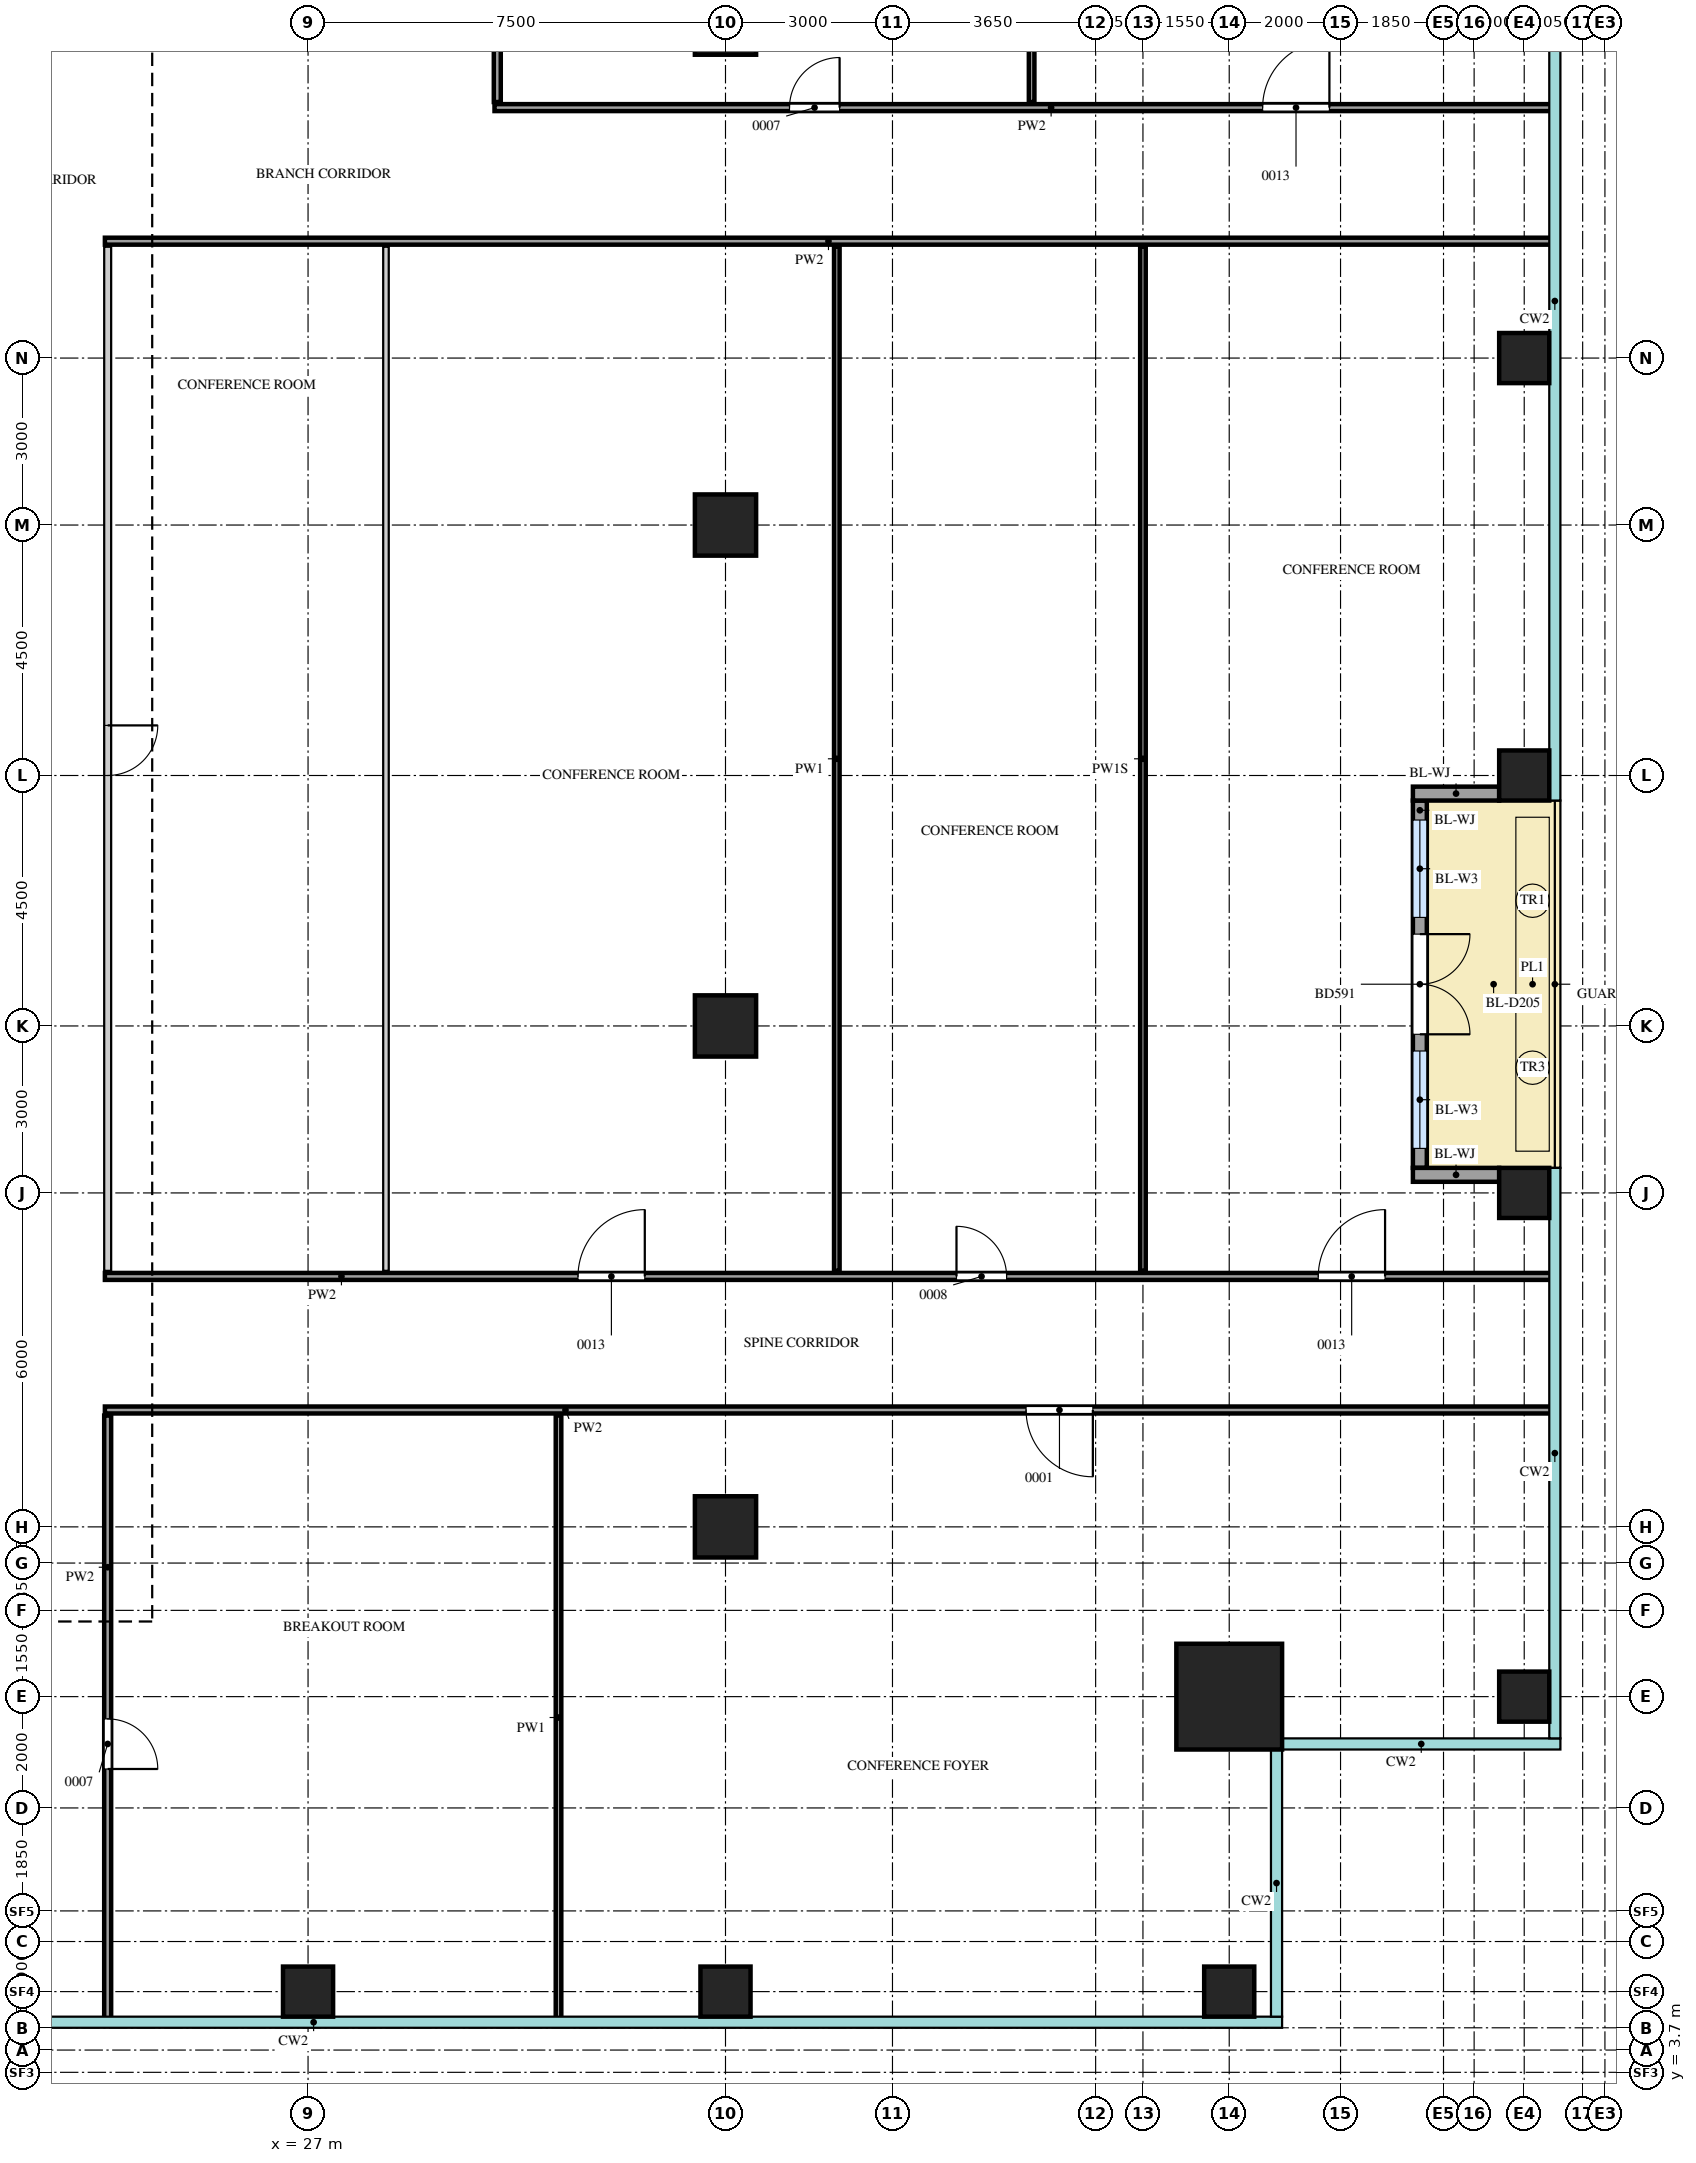
"""IFC4 building model, lengths in metres.
Left out: names, types, materials, properties, quantities, classifications, styles, units other than length and angle.
Written with IfcOpenShell. Run it as: python <this file> out.ifc"""

import sys

from ifc_helpers import new_model, si_unit, direction, frame, frame_2d, origin, origin_2d, place, context, subcontext, project, spatial, rectangle, extrude, source, transform, mapped, element, fill, save


model = new_model("IFC4")
c1 = context("Model", 3, precision=1e-05, world=origin(), true_north=direction((0.0, 1.0)))
c2 = subcontext(c1, "Body", "Model", "MODEL_VIEW")
j1 = project(units=[si_unit("LENGTHUNIT", "METRE"), si_unit("PLANEANGLEUNIT", "RADIAN")], contexts=[c1])
p1 = place(None, origin())
s1 = spatial("IfcSite", under=j1, at=p1, CompositionType="ELEMENT")
p2 = place(p1, origin())
s2 = spatial("IfcBuilding", under=s1, at=p2, CompositionType="ELEMENT")
p3 = place(p2, frame((0.0, 0.0, 262.2)))
s3 = spatial("IfcBuildingStorey", under=s2, at=p3, CompositionType="ELEMENT", Elevation=262.2)
m1 = source(origin(), c2, "Body", "SweptSolid", [
    extrude(rectangle(XDim=1.9, YDim=1.9, at=origin_2d()), origin(), (0.0, 0.0, 1.0), 4.0),
])
p4 = place(p3, frame((43.55, 10.45, 0.0), z_axis=(0.0, 0.0, 1.0), x_axis=(1.0, 0.0, 0.0)))
e1 = element("IfcColumn", 1, at=p4, inside=s3, PredefinedType="COLUMN", context=c2, shape_type="MappedRepresentation", body=[
    mapped(m1, transform((0.0, 0.0, 0.0))),
])
m2 = source(origin(), c2, "Body", "SweptSolid", [
    extrude(rectangle(XDim=0.9, YDim=0.9, at=origin_2d()), origin(), (0.0, 0.0, 1.0), 3.75),
])
for number, where, z_axis, x_axis in (
    (2, (27.0, 5.15, 0.0), (0.0, 0.0, 1.0), (1.0, 0.0, 0.0)),
    (3, (34.5, 5.15, 0.0), (0.0, 0.0, 1.0), (1.0, 0.0, 0.0)),
    (4, (43.55, 5.15, 0.0), (0.0, 0.0, 1.0), (1.0, 0.0, 0.0)),
    (5, (48.85, 10.45, 0.0), (0.0, 0.0, 1.0), (1.0, 0.0, 0.0)),
    (6, (48.85, 19.5, 0.0), (0.0, 0.0, 1.0), (1.0, 0.0, 0.0)),
    (7, (48.85, 27.0, 0.0), (0.0, 0.0, 1.0), (1.0, 0.0, 0.0)),
    (8, (48.85, 34.5, 0.0), (0.0, 0.0, 1.0), (1.0, 0.0, 0.0)),
):
    element("IfcColumn", number, at=place(p3, frame(where, z_axis=z_axis, x_axis=x_axis)), inside=s3, PredefinedType="COLUMN", context=c2, shape_type="MappedRepresentation", body=[
        mapped(m2, transform((0.0, 0.0, 0.0))),
    ])
m3 = source(origin(), c2, "Body", "SweptSolid", [
    extrude(rectangle(XDim=1.1, YDim=1.1, at=origin_2d()), origin(), (0.0, 0.0, 1.0), 3.75),
])
for number, where, z_axis, x_axis in (
    (9, (34.5, 13.5, 0.0), (0.0, 0.0, 1.0), (1.0, 0.0, 0.0)),
    (10, (34.5, 22.5, 0.0), (0.0, 0.0, 1.0), (1.0, 0.0, 0.0)),
    (11, (34.5, 31.5, 0.0), (0.0, 0.0, 1.0), (1.0, 0.0, 0.0)),
    (12, (34.5, 40.5, 0.0), (0.0, 0.0, 1.0), (1.0, 0.0, 0.0)),
):
    element("IfcColumn", number, at=place(p3, frame(where, z_axis=z_axis, x_axis=x_axis)), inside=s3, PredefinedType="COLUMN", context=c2, shape_type="MappedRepresentation", body=[
        mapped(m3, transform((0.0, 0.0, 0.0))),
    ])
m4 = source(origin(), c2, "Body", "SweptSolid", [
    extrude(rectangle(XDim=6.6, YDim=0.25, at=frame_2d((3.3, 0.0))), origin(), (0.0, 0.0, 1.0), 3.2),
])
p5 = place(p3, frame((46.975, 19.95, 0.0), z_axis=(0.0, 0.0, 1.0), x_axis=(0.0, 1.0, 0.0)))
e13 = element("IfcWall", 13, at=p5, inside=s3, PredefinedType="SOLIDWALL", context=c2, shape_type="MappedRepresentation", body=[
    mapped(m4, transform((0.0, 0.0, 0.0))),
])
m5 = source(origin(), c2, "Body", "SweptSolid", [
    extrude(rectangle(XDim=1.75, YDim=2.4, at=frame_2d((0.875, 1.2))), frame((0.0, 0.135, 0.0), z_axis=(0.0, -1.0, 0.0), x_axis=(1.0, 0.0, 0.0)), (0.0, 0.0, 1.0), 0.27),
])
p6 = place(p5, frame((0.35, 0.0, 0.0)))
e14 = element("IfcOpeningElement", 14, at=p6, cuts=e13, PredefinedType="OPENING", context=c2, shape_type="MappedRepresentation", body=[
    mapped(m5, transform((0.0, 0.0, 0.0))),
])
p7 = place(p5, frame((4.5, 0.0, 0.0)))
e15 = element("IfcOpeningElement", 15, at=p7, cuts=e13, PredefinedType="OPENING", context=c2, shape_type="MappedRepresentation", body=[
    mapped(m5, transform((0.0, 0.0, 0.0))),
])
m6 = source(origin(), c2, "Body", "SweptSolid", [
    extrude(rectangle(XDim=1.8, YDim=2.4, at=frame_2d((0.9, 1.2))), frame((0.0, 0.135, 0.0), z_axis=(0.0, -1.0, 0.0), x_axis=(1.0, 0.0, 0.0)), (0.0, 0.0, 1.0), 0.27),
])
p8 = place(p5, frame((2.4, 0.0, 0.0)))
e16 = element("IfcOpeningElement", 16, at=p8, cuts=e13, PredefinedType="OPENING", context=c2, shape_type="MappedRepresentation", body=[
    mapped(m6, transform((0.0, 0.0, 0.0))),
])
m7 = source(origin(), c2, "Body", "SweptSolid", [
    extrude(rectangle(XDim=1.55, YDim=0.25, at=frame_2d((0.775, 0.0))), origin(), (0.0, 0.0, 1.0), 3.2),
])
for number, where, z_axis, x_axis in (
    (17, (48.4, 19.825, 0.0), (0.0, 0.0, 1.0), (-1.0, 0.0, 0.0)),
    (18, (48.4, 26.675, 0.0), (0.0, 0.0, 1.0), (-1.0, 0.0, 0.0)),
):
    element("IfcWall", number, at=place(p3, frame(where, z_axis=z_axis, x_axis=x_axis)), inside=s3, PredefinedType="SOLIDWALL", context=c2, shape_type="MappedRepresentation", body=[
        mapped(m7, transform((0.0, 0.0, 0.0))),
    ])
m8 = source(origin(), c2, "Body", "SweptSolid", [
    extrude(rectangle(XDim=10.85, YDim=0.125, at=frame_2d((5.425, 0.0))), origin(), (0.0, 0.0, 1.0), 3.8),
])
p9 = place(p3, frame((23.4, 4.65, 0.0), z_axis=(0.0, 0.0, 1.0), x_axis=(0.0, 1.0, 0.0)))
e19 = element("IfcWall", 19, at=p9, inside=s3, PredefinedType="PARTITIONING", context=c2, shape_type="MappedRepresentation", body=[
    mapped(m8, transform((0.0, 0.0, 0.0))),
])
m9 = source(origin(), c2, "Body", "SweptSolid", [
    extrude(rectangle(XDim=0.9, YDim=2.1, at=frame_2d((0.45, 1.05))), frame((0.0, 0.073, 0.0), z_axis=(0.0, -1.0, 0.0), x_axis=(1.0, 0.0, 0.0)), (0.0, 0.0, 1.0), 0.145),
])
p10 = place(p9, frame((4.5, 0.0, 0.0)))
e20 = element("IfcOpeningElement", 20, at=p10, cuts=e19, PredefinedType="OPENING", context=c2, shape_type="MappedRepresentation", body=[
    mapped(m9, transform((0.0, 0.0, 0.0))),
])
m10 = source(origin(), c2, "Body", "SweptSolid", [
    extrude(rectangle(XDim=10.85, YDim=0.1, at=frame_2d((5.425, 0.0))), origin(), (0.0, 0.0, 1.0), 3.8),
])
p11 = place(p3, frame((31.5, 4.65, 0.0), z_axis=(0.0, 0.0, 1.0), x_axis=(0.0, 1.0, 0.0)))
e21 = element("IfcWall", 21, at=p11, inside=s3, PredefinedType="PARTITIONING", context=c2, shape_type="MappedRepresentation", body=[
    mapped(m10, transform((0.0, 0.0, 0.0))),
])
m11 = source(origin(), c2, "Body", "SweptSolid", [
    extrude(rectangle(XDim=26.0, YDim=0.125, at=frame_2d((13.0, 0.0))), origin(), (0.0, 0.0, 1.0), 3.8),
])
p12 = place(p3, frame((23.35, 15.6, 0.0), z_axis=(0.0, 0.0, 1.0), x_axis=(1.0, 0.0, 0.0)))
e22 = element("IfcWall", 22, at=p12, inside=s3, PredefinedType="PARTITIONING", context=c2, shape_type="MappedRepresentation", body=[
    mapped(m11, transform((0.0, 0.0, 0.0))),
])
m12 = source(origin(), c2, "Body", "SweptSolid", [
    extrude(rectangle(XDim=1.2, YDim=2.1, at=frame_2d((0.6, 1.05))), frame((0.0, 0.073, 0.0), z_axis=(0.0, -1.0, 0.0), x_axis=(1.0, 0.0, 0.0)), (0.0, 0.0, 1.0), 0.145),
])
p13 = place(p12, frame((16.55, 0.0, 0.0)))
e23 = element("IfcOpeningElement", 23, at=p13, cuts=e22, PredefinedType="OPENING", context=c2, shape_type="MappedRepresentation", body=[
    mapped(m12, transform((0.0, 0.0, 0.0))),
])
p14 = place(p3, frame((23.35, 18.0, 0.0), z_axis=(0.0, 0.0, 1.0), x_axis=(1.0, 0.0, 0.0)))
e24 = element("IfcWall", 24, at=p14, inside=s3, PredefinedType="PARTITIONING", context=c2, shape_type="MappedRepresentation", body=[
    mapped(m11, transform((0.0, 0.0, 0.0))),
])
p15 = place(p14, frame((8.5, 0.0, 0.0)))
e25 = element("IfcOpeningElement", 25, at=p15, cuts=e24, PredefinedType="OPENING", context=c2, shape_type="MappedRepresentation", body=[
    mapped(m12, transform((0.0, 0.0, 0.0))),
])
p16 = place(p14, frame((15.3, 0.0, 0.0)))
e26 = element("IfcOpeningElement", 26, at=p16, cuts=e24, PredefinedType="OPENING", context=c2, shape_type="MappedRepresentation", body=[
    mapped(m9, transform((0.0, 0.0, 0.0))),
])
p17 = place(p14, frame((21.8, 0.0, 0.0)))
e27 = element("IfcOpeningElement", 27, at=p17, cuts=e24, PredefinedType="OPENING", context=c2, shape_type="MappedRepresentation", body=[
    mapped(m12, transform((0.0, 0.0, 0.0))),
])
m13 = source(origin(), c2, "Body", "SweptSolid", [
    extrude(rectangle(XDim=18.4, YDim=0.125, at=frame_2d((9.2, 0.0))), origin(), (0.0, 0.0, 1.0), 3.8),
])
p18 = place(p3, frame((23.4, 18.1, 0.0), z_axis=(0.0, 0.0, 1.0), x_axis=(0.0, 1.0, 0.0)))
e28 = element("IfcWall", 28, at=p18, inside=s3, PredefinedType="PARTITIONING", context=c2, shape_type="MappedRepresentation", body=[
    mapped(m13, transform((0.0, 0.0, 0.0))),
])
p19 = place(p18, frame((8.9, 0.0, 0.0)))
e29 = element("IfcOpeningElement", 29, at=p19, cuts=e28, PredefinedType="OPENING", context=c2, shape_type="MappedRepresentation", body=[
    mapped(m9, transform((0.0, 0.0, 0.0))),
])
m14 = source(origin(), c2, "Body", "SweptSolid", [
    extrude(rectangle(XDim=18.4, YDim=0.1, at=frame_2d((9.2, 0.0))), origin(), (0.0, 0.0, 1.0), 3.8),
])
for number, where, z_axis, x_axis in (
    (30, (28.4, 18.1, 0.0), (0.0, 0.0, 1.0), (0.0, 1.0, 0.0)),
    (31, (36.5, 18.1, 0.0), (0.0, 0.0, 1.0), (0.0, 1.0, 0.0)),
):
    element("IfcWall", number, at=place(p3, frame(where, z_axis=z_axis, x_axis=x_axis)), inside=s3, PredefinedType="PARTITIONING", context=c2, shape_type="MappedRepresentation", body=[
        mapped(m14, transform((0.0, 0.0, 0.0))),
    ])
m15 = source(origin(), c2, "Body", "SweptSolid", [
    extrude(rectangle(XDim=18.4, YDim=0.1, at=frame_2d((9.2, 0.0))), origin(), (0.0, 0.0, 1.0), 3.35),
])
p20 = place(p3, frame((42.0, 18.1, 0.0), z_axis=(0.0, 0.0, 1.0), x_axis=(0.0, 1.0, 0.0)))
e32 = element("IfcWall", 32, at=p20, inside=s3, PredefinedType="PARTITIONING", context=c2, shape_type="MappedRepresentation", body=[
    mapped(m15, transform((0.0, 0.0, 0.0))),
])
p21 = place(p3, frame((23.35, 36.6, 0.0), z_axis=(0.0, 0.0, 1.0), x_axis=(1.0, 0.0, 0.0)))
e33 = element("IfcWall", 33, at=p21, inside=s3, PredefinedType="PARTITIONING", context=c2, shape_type="MappedRepresentation", body=[
    mapped(m11, transform((0.0, 0.0, 0.0))),
])
m16 = source(origin(), c2, "Body", "SweptSolid", [
    extrude(rectangle(XDim=19.0, YDim=0.125, at=frame_2d((9.5, 0.0))), origin(), (0.0, 0.0, 1.0), 3.8),
])
p22 = place(p3, frame((30.35, 39.0, 0.0), z_axis=(0.0, 0.0, 1.0), x_axis=(1.0, 0.0, 0.0)))
e34 = element("IfcWall", 34, at=p22, inside=s3, PredefinedType="PARTITIONING", context=c2, shape_type="MappedRepresentation", body=[
    mapped(m16, transform((0.0, 0.0, 0.0))),
])
p23 = place(p22, frame((5.3, 0.0, 0.0)))
e35 = element("IfcOpeningElement", 35, at=p23, cuts=e34, PredefinedType="OPENING", context=c2, shape_type="MappedRepresentation", body=[
    mapped(m9, transform((0.0, 0.0, 0.0))),
])
p24 = place(p22, frame((13.8, 0.0, 0.0)))
e36 = element("IfcOpeningElement", 36, at=p24, cuts=e34, PredefinedType="OPENING", context=c2, shape_type="MappedRepresentation", body=[
    mapped(m12, transform((0.0, 0.0, 0.0))),
])
m17 = source(origin(), c2, "Body", "SweptSolid", [
    extrude(rectangle(XDim=10.25, YDim=0.125, at=frame_2d((5.125, 0.0))), origin(), (0.0, 0.0, 1.0), 3.8),
])
p25 = place(p3, frame((30.4, 39.1, 0.0), z_axis=(0.0, 0.0, 1.0), x_axis=(0.0, 1.0, 0.0)))
e37 = element("IfcWall", 37, at=p25, inside=s3, PredefinedType="PARTITIONING", context=c2, shape_type="MappedRepresentation", body=[
    mapped(m17, transform((0.0, 0.0, 0.0))),
])
m18 = source(origin(), c2, "Body", "SweptSolid", [
    extrude(rectangle(XDim=10.25, YDim=0.1, at=frame_2d((5.125, 0.0))), origin(), (0.0, 0.0, 1.0), 3.8),
])
p26 = place(p3, frame((40.0, 39.1, 0.0), z_axis=(0.0, 0.0, 1.0), x_axis=(0.0, 1.0, 0.0)))
e38 = element("IfcWall", 38, at=p26, inside=s3, PredefinedType="PARTITIONING", context=c2, shape_type="MappedRepresentation", body=[
    mapped(m18, transform((0.0, 0.0, 0.0))),
])
m19 = source(origin(), c2, "Body", "SweptSolid", [
    extrude(rectangle(XDim=1.75, YDim=2.4, at=frame_2d((0.875, 1.2))), frame((0.0, 0.03, 0.0), z_axis=(0.0, -1.0, 0.0), x_axis=(1.0, 0.0, 0.0)), (0.0, 0.0, 1.0), 0.06),
])
p27 = place(p6, origin())
e39 = element("IfcWindow", 39, at=p27, inside=s3, PartitioningType="SINGLE_PANEL", PredefinedType="WINDOW", context=c2, shape_type="MappedRepresentation", body=[
    mapped(m19, transform((0.0, 0.0, 0.0))),
])
fill(e14, e39)
p28 = place(p7, origin())
e40 = element("IfcWindow", 40, at=p28, inside=s3, PartitioningType="SINGLE_PANEL", PredefinedType="WINDOW", context=c2, shape_type="MappedRepresentation", body=[
    mapped(m19, transform((0.0, 0.0, 0.0))),
])
fill(e15, e40)
m20 = source(origin(), c2, "Body", "SweptSolid", [
    extrude(rectangle(XDim=1.8, YDim=2.4, at=frame_2d((0.9, 1.2))), frame((0.0, 0.025, 0.0), z_axis=(0.0, -1.0, 0.0), x_axis=(1.0, 0.0, 0.0)), (0.0, 0.0, 1.0), 0.05),
])
p29 = place(p8, origin())
e41 = element("IfcDoor", 41, at=p29, inside=s3, OperationType="DOUBLE_DOOR_DOUBLE_SWING", PredefinedType="DOOR", context=c2, shape_type="MappedRepresentation", body=[
    mapped(m20, transform((0.0, 0.0, 0.0))),
])
fill(e16, e41)
m21 = source(origin(), c2, "Body", "SweptSolid", [
    extrude(rectangle(XDim=0.9, YDim=2.1, at=frame_2d((0.45, 1.05))), frame((0.0, 0.025, 0.0), z_axis=(0.0, -1.0, 0.0), x_axis=(1.0, 0.0, 0.0)), (0.0, 0.0, 1.0), 0.05),
])
p30 = place(p10, origin())
e42 = element("IfcDoor", 42, at=p30, inside=s3, OperationType="SINGLE_SWING_LEFT", PredefinedType="DOOR", context=c2, shape_type="MappedRepresentation", body=[
    mapped(m21, transform((0.0, 0.0, 0.0))),
])
fill(e20, e42)
m22 = source(origin(), c2, "Body", "SweptSolid", [
    extrude(rectangle(XDim=1.2, YDim=2.1, at=frame_2d((0.6, 1.05))), frame((0.0, 0.025, 0.0), z_axis=(0.0, -1.0, 0.0), x_axis=(1.0, 0.0, 0.0)), (0.0, 0.0, 1.0), 0.05),
])
p31 = place(p13, origin())
e43 = element("IfcDoor", 43, at=p31, inside=s3, OperationType="SINGLE_SWING_RIGHT", PredefinedType="DOOR", context=c2, shape_type="MappedRepresentation", body=[
    mapped(m22, transform((0.0, 0.0, 0.0))),
])
fill(e23, e43)
p32 = place(p19, origin())
e44 = element("IfcDoor", 44, at=p32, inside=s3, OperationType="SINGLE_SWING_RIGHT", PredefinedType="DOOR", context=c2, shape_type="MappedRepresentation", body=[
    mapped(m21, transform((0.0, 0.0, 0.0))),
])
fill(e29, e44)
p33 = place(p15, origin())
e45 = element("IfcDoor", 45, at=p33, inside=s3, OperationType="SINGLE_SWING_LEFT", PredefinedType="DOOR", context=c2, shape_type="MappedRepresentation", body=[
    mapped(m22, transform((0.0, 0.0, 0.0))),
])
fill(e25, e45)
p34 = place(p16, origin())
e46 = element("IfcDoor", 46, at=p34, inside=s3, OperationType="SINGLE_SWING_RIGHT", PredefinedType="DOOR", context=c2, shape_type="MappedRepresentation", body=[
    mapped(m21, transform((0.0, 0.0, 0.0))),
])
fill(e26, e46)
p35 = place(p17, origin())
e47 = element("IfcDoor", 47, at=p35, inside=s3, OperationType="SINGLE_SWING_LEFT", PredefinedType="DOOR", context=c2, shape_type="MappedRepresentation", body=[
    mapped(m22, transform((0.0, 0.0, 0.0))),
])
fill(e27, e47)
p36 = place(p23, origin())
e48 = element("IfcDoor", 48, at=p36, inside=s3, OperationType="SINGLE_SWING_LEFT", PredefinedType="DOOR", context=c2, shape_type="MappedRepresentation", body=[
    mapped(m21, transform((0.0, 0.0, 0.0))),
])
fill(e35, e48)
p37 = place(p24, origin())
e49 = element("IfcDoor", 49, at=p37, inside=s3, OperationType="SINGLE_SWING_LEFT", PredefinedType="DOOR", context=c2, shape_type="MappedRepresentation", body=[
    mapped(m22, transform((0.0, 0.0, 0.0))),
])
fill(e36, e49)
save(model, sys.argv[1])
